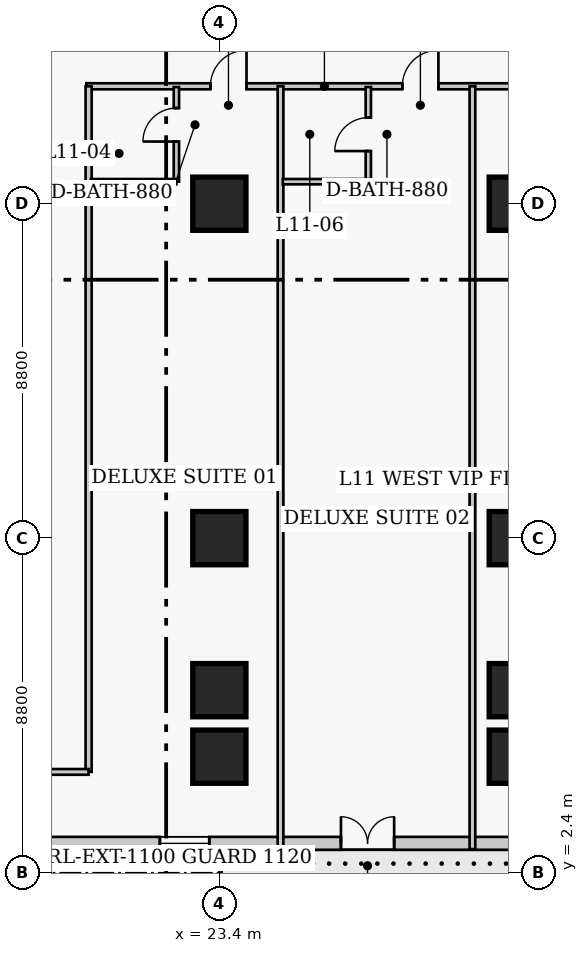
"""IFC4 building model, lengths in metres.
Left out: names, types, materials, properties, quantities, classifications, styles, units other than length and angle.
Written with IfcOpenShell. Run it as: python <this file> out.ifc"""

import sys

from ifc_helpers import new_model, si_unit, direction, frame, frame_2d, origin, origin_2d, place, context, subcontext, project, spatial, rectangle, extrude, element, fill, save


model = new_model("IFC4")
c1 = context("Model", 3, precision=1e-05, world=origin(), true_north=direction((0.0, 1.0)))
c2 = subcontext(c1, "Body", "Model", "MODEL_VIEW")
j1 = project(units=[si_unit("LENGTHUNIT", "METRE"), si_unit("PLANEANGLEUNIT", "RADIAN")], contexts=[c1])
p1 = place(None, origin())
s1 = spatial("IfcSite", under=j1, at=p1, CompositionType="ELEMENT")
p2 = place(p1, origin())
s2 = spatial("IfcBuilding", under=s1, at=p2, CompositionType="ELEMENT")
p3 = place(p2, frame((0.0, 0.0, 48.8)))
s3 = spatial("IfcBuildingStorey", under=s2, at=p3, CompositionType="ELEMENT", Elevation=48.8)
for number, where, z_axis, x_axis in (
    (1, (23.4, 11.2, 0.0), (0.0, 0.0, 1.0), (1.0, 0.0, 0.0)),
    (2, (23.4, 20.0, 0.0), (0.0, 0.0, 1.0), (1.0, 0.0, 0.0)),
    (3, (31.2, 11.2, 0.0), (0.0, 0.0, 1.0), (1.0, 0.0, 0.0)),
    (4, (31.2, 20.0, 0.0), (0.0, 0.0, 1.0), (1.0, 0.0, 0.0)),
    (5, (23.4, 7.2, 0.0), (0.0, 0.0, 1.0), (1.0, 0.0, 0.0)),
    (6, (31.2, 7.2, 0.0), (0.0, 0.0, 1.0), (1.0, 0.0, 0.0)),
    (7, (23.4, 5.45, 0.0), (0.0, 0.0, 1.0), (1.0, 0.0, 0.0)),
    (8, (31.2, 5.45, 0.0), (0.0, 0.0, 1.0), (1.0, 0.0, 0.0)),
):
    element("IfcColumn", number, at=place(p3, frame(where, z_axis=z_axis, x_axis=x_axis)), inside=s3, PredefinedType="COLUMN", context=c2, shape_type="SweptSolid", body=[
        extrude(rectangle(XDim=1.4, YDim=1.4, at=origin_2d()), origin(), (0.0, 0.0, 1.0), 3.8),
    ])
p4 = place(p3, frame((6.43, 3.17, 0.0), z_axis=(0.0, 0.0, 1.0), x_axis=(1.0, 0.0, 0.0)))
e9 = element("IfcWall", 9, at=p4, inside=s3, PredefinedType="SOLIDWALL", context=c2, shape_type="SweptSolid", body=[
    extrude(rectangle(XDim=29.89, YDim=0.34, at=frame_2d((14.945, 0.0))), origin(), (0.0, 0.0, 1.0), 3.54),
])
p5 = place(p4, frame((20.17, 0.0, 0.0)))
e10 = element("IfcOpeningElement", 10, at=p5, cuts=e9, PredefinedType="OPENING", context=c2, shape_type="SweptSolid", body=[
    extrude(rectangle(XDim=1.4, YDim=2.15, at=frame_2d((0.7, 1.075))), frame((0.0, 0.18, 0.0), z_axis=(0.0, -1.0, 0.0), x_axis=(1.0, 0.0, 0.0)), (0.0, 0.0, 1.0), 0.36),
])
p6 = place(p4, frame((2.686, 0.0, 0.85)))
e11 = element("IfcOpeningElement", 11, at=p6, cuts=e9, PredefinedType="OPENING", context=c2, shape_type="SweptSolid", body=[
    extrude(rectangle(XDim=2.1, YDim=1.85, at=frame_2d((1.05, 0.925))), frame((0.0, 0.18, 0.0), z_axis=(0.0, -1.0, 0.0), x_axis=(1.0, 0.0, 0.0)), (0.0, 0.0, 1.0), 0.36),
])
p7 = place(p4, frame((25.104, 0.0, 0.85)))
e12 = element("IfcOpeningElement", 12, at=p7, cuts=e9, PredefinedType="OPENING", context=c2, shape_type="SweptSolid", body=[
    extrude(rectangle(XDim=2.1, YDim=1.85, at=frame_2d((1.05, 0.925))), frame((0.0, 0.18, 0.0), z_axis=(0.0, -1.0, 0.0), x_axis=(1.0, 0.0, 0.0)), (0.0, 0.0, 1.0), 0.36),
])
p8 = place(p4, frame((15.405, 0.0, 0.85)))
e13 = element("IfcOpeningElement", 13, at=p8, cuts=e9, PredefinedType="OPENING", context=c2, shape_type="SweptSolid", body=[
    extrude(rectangle(XDim=1.3, YDim=1.7, at=frame_2d((0.65, 0.85))), frame((0.0, 0.18, 0.0), z_axis=(0.0, -1.0, 0.0), x_axis=(1.0, 0.0, 0.0)), (0.0, 0.0, 1.0), 0.36),
])
p9 = place(p3, frame((19.9, 23.09, 0.0), z_axis=(0.0, 0.0, 1.0), x_axis=(1.0, 0.0, 0.0)))
e14 = element("IfcWall", 14, at=p9, inside=s3, PredefinedType="PARTITIONING", context=c2, shape_type="SweptSolid", body=[
    extrude(rectangle(XDim=15.9, YDim=0.16, at=frame_2d((7.95, 0.0))), origin(), (0.0, 0.0, 1.0), 3.54),
])
p10 = place(p9, frame((3.265, 0.0, 0.0)))
e15 = element("IfcOpeningElement", 15, at=p10, cuts=e14, PredefinedType="OPENING", context=c2, shape_type="SweptSolid", body=[
    extrude(rectangle(XDim=0.95, YDim=2.1, at=frame_2d((0.475, 1.05))), frame((0.0, 0.09, 0.0), z_axis=(0.0, -1.0, 0.0), x_axis=(1.0, 0.0, 0.0)), (0.0, 0.0, 1.0), 0.18),
])
p11 = place(p9, frame((8.315, 0.0, 0.0)))
e16 = element("IfcOpeningElement", 16, at=p11, cuts=e14, PredefinedType="OPENING", context=c2, shape_type="SweptSolid", body=[
    extrude(rectangle(XDim=0.95, YDim=2.1, at=frame_2d((0.475, 1.05))), frame((0.0, 0.09, 0.0), z_axis=(0.0, -1.0, 0.0), x_axis=(1.0, 0.0, 0.0)), (0.0, 0.0, 1.0), 0.18),
])
p12 = place(p9, frame((12.53, 0.0, 0.0)))
e17 = element("IfcOpeningElement", 17, at=p12, cuts=e14, PredefinedType="OPENING", context=c2, shape_type="SweptSolid", body=[
    extrude(rectangle(XDim=1.0, YDim=2.15, at=frame_2d((0.5, 1.075))), frame((0.0, 0.09, 0.0), z_axis=(0.0, -1.0, 0.0), x_axis=(1.0, 0.0, 0.0)), (0.0, 0.0, 1.0), 0.18),
])
p13 = place(p3, frame((19.96, 5.05, 0.0), z_axis=(0.0, 0.0, 1.0), x_axis=(0.0, 1.0, 0.0)))
e18 = element("IfcWall", 18, at=p13, inside=s3, PredefinedType="PARTITIONING", context=c2, shape_type="SweptSolid", body=[
    extrude(rectangle(XDim=18.04, YDim=0.16, at=frame_2d((9.02, 0.0))), origin(), (0.0, 0.0, 1.0), 3.54),
])
p14 = place(p3, frame((17.74, 5.05, 0.0), z_axis=(0.0, 0.0, 1.0), x_axis=(1.0, 0.0, 0.0)))
e19 = element("IfcWall", 19, at=p14, inside=s3, PredefinedType="PARTITIONING", context=c2, shape_type="SweptSolid", body=[
    extrude(rectangle(XDim=2.22, YDim=0.15, at=frame_2d((1.11, 0.0))), origin(), (0.0, 0.0, 1.0), 3.54),
])
p15 = place(p3, frame((22.27, 20.58, 0.0), z_axis=(0.0, 0.0, 1.0), x_axis=(0.0, 1.0, 0.0)))
e20 = element("IfcWall", 20, at=p15, inside=s3, PredefinedType="PLUMBINGWALL", context=c2, shape_type="SweptSolid", body=[
    extrude(rectangle(XDim=2.49, YDim=0.14, at=frame_2d((1.245, 0.0))), origin(), (0.0, 0.0, 1.0), 3.54),
])
p16 = place(p15, frame((1.056, 0.0, 0.0)))
e21 = element("IfcOpeningElement", 21, at=p16, cuts=e20, PredefinedType="OPENING", context=c2, shape_type="SweptSolid", body=[
    extrude(rectangle(XDim=0.88, YDim=2.05, at=frame_2d((0.44, 1.025))), frame((0.0, 0.08, 0.0), z_axis=(0.0, -1.0, 0.0), x_axis=(1.0, 0.0, 0.0)), (0.0, 0.0, 1.0), 0.16),
])
p17 = place(p3, frame((20.02, 20.58, 0.0), z_axis=(0.0, 0.0, 1.0), x_axis=(1.0, 0.0, 0.0)))
e22 = element("IfcWall", 22, at=p17, inside=s3, PredefinedType="PLUMBINGWALL", context=c2, shape_type="SweptSolid", body=[
    extrude(rectangle(XDim=2.25, YDim=0.14, at=frame_2d((1.125, 0.0))), origin(), (0.0, 0.0, 1.0), 3.54),
])
p18 = place(p3, frame((25.01, 3.02, 0.0), z_axis=(0.0, 0.0, 1.0), x_axis=(0.0, 1.0, 0.0)))
e23 = element("IfcWall", 23, at=p18, inside=s3, PredefinedType="PARTITIONING", context=c2, shape_type="SweptSolid", body=[
    extrude(rectangle(XDim=20.07, YDim=0.15, at=frame_2d((10.035, 0.0))), origin(), (0.0, 0.0, 1.0), 3.54),
])
p19 = place(p3, frame((27.32, 20.58, 0.0), z_axis=(0.0, 0.0, 1.0), x_axis=(0.0, 1.0, 0.0)))
e24 = element("IfcWall", 24, at=p19, inside=s3, PredefinedType="PLUMBINGWALL", context=c2, shape_type="SweptSolid", body=[
    extrude(rectangle(XDim=2.49, YDim=0.14, at=frame_2d((1.245, 0.0))), origin(), (0.0, 0.0, 1.0), 3.54),
])
p20 = place(p19, frame((0.805, 0.0, 0.0)))
e25 = element("IfcOpeningElement", 25, at=p20, cuts=e24, PredefinedType="OPENING", context=c2, shape_type="SweptSolid", body=[
    extrude(rectangle(XDim=0.88, YDim=2.05, at=frame_2d((0.44, 1.025))), frame((0.0, 0.08, 0.0), z_axis=(0.0, -1.0, 0.0), x_axis=(1.0, 0.0, 0.0)), (0.0, 0.0, 1.0), 0.16),
])
p21 = place(p3, frame((25.07, 20.58, 0.0), z_axis=(0.0, 0.0, 1.0), x_axis=(1.0, 0.0, 0.0)))
e26 = element("IfcWall", 26, at=p21, inside=s3, PredefinedType="PLUMBINGWALL", context=c2, shape_type="SweptSolid", body=[
    extrude(rectangle(XDim=2.25, YDim=0.14, at=frame_2d((1.125, 0.0))), origin(), (0.0, 0.0, 1.0), 3.54),
])
p22 = place(p3, frame((30.06, 3.02, 0.0), z_axis=(0.0, 0.0, 1.0), x_axis=(0.0, 1.0, 0.0)))
e27 = element("IfcWall", 27, at=p22, inside=s3, PredefinedType="PARTITIONING", context=c2, shape_type="SweptSolid", body=[
    extrude(rectangle(XDim=20.07, YDim=0.15, at=frame_2d((10.035, 0.0))), origin(), (0.0, 0.0, 1.0), 3.54),
])
p23 = place(p5, origin())
e28 = element("IfcDoor", 28, at=p23, inside=s3, OperationType="DOUBLE_DOOR_SINGLE_SWING", PredefinedType="DOOR", context=c2, shape_type="SweptSolid", body=[
    extrude(rectangle(XDim=1.4, YDim=2.15, at=frame_2d((0.7, 1.075))), frame((0.0, 0.025, 0.0), z_axis=(0.0, -1.0, 0.0), x_axis=(1.0, 0.0, 0.0)), (0.0, 0.0, 1.0), 0.05),
])
fill(e10, e28)
p24 = place(p8, origin())
e29 = element("IfcWindow", 29, at=p24, inside=s3, PartitioningType="SINGLE_PANEL", PredefinedType="WINDOW", context=c2, shape_type="SweptSolid", body=[
    extrude(rectangle(XDim=1.3, YDim=1.7, at=frame_2d((0.65, 0.85))), frame((0.0, 0.03, 0.0), z_axis=(0.0, -1.0, 0.0), x_axis=(1.0, 0.0, 0.0)), (0.0, 0.0, 1.0), 0.06),
])
fill(e13, e29)
p25 = place(p16, origin())
e30 = element("IfcDoor", 30, at=p25, inside=s3, OperationType="SINGLE_SWING_LEFT", PredefinedType="DOOR", context=c2, shape_type="SweptSolid", body=[
    extrude(rectangle(XDim=0.88, YDim=2.05, at=frame_2d((0.44, 1.025))), frame((0.0, 0.025, 0.0), z_axis=(0.0, -1.0, 0.0), x_axis=(1.0, 0.0, 0.0)), (0.0, 0.0, 1.0), 0.05),
])
fill(e21, e30)
p26 = place(p10, origin())
e31 = element("IfcDoor", 31, at=p26, inside=s3, OperationType="SINGLE_SWING_RIGHT", PredefinedType="DOOR", context=c2, shape_type="SweptSolid", body=[
    extrude(rectangle(XDim=0.95, YDim=2.1, at=frame_2d((0.475, 1.05))), frame((0.0, 0.025, 0.0), z_axis=(0.0, -1.0, 0.0), x_axis=(1.0, 0.0, 0.0)), (0.0, 0.0, 1.0), 0.05),
])
fill(e15, e31)
p27 = place(p20, origin())
e32 = element("IfcDoor", 32, at=p27, inside=s3, OperationType="SINGLE_SWING_LEFT", PredefinedType="DOOR", context=c2, shape_type="SweptSolid", body=[
    extrude(rectangle(XDim=0.88, YDim=2.05, at=frame_2d((0.44, 1.025))), frame((0.0, 0.025, 0.0), z_axis=(0.0, -1.0, 0.0), x_axis=(1.0, 0.0, 0.0)), (0.0, 0.0, 1.0), 0.05),
])
fill(e25, e32)
p28 = place(p11, origin())
e33 = element("IfcDoor", 33, at=p28, inside=s3, OperationType="SINGLE_SWING_RIGHT", PredefinedType="DOOR", context=c2, shape_type="SweptSolid", body=[
    extrude(rectangle(XDim=0.95, YDim=2.1, at=frame_2d((0.475, 1.05))), frame((0.0, 0.025, 0.0), z_axis=(0.0, -1.0, 0.0), x_axis=(1.0, 0.0, 0.0)), (0.0, 0.0, 1.0), 0.05),
])
fill(e16, e33)
save(model, sys.argv[1])
